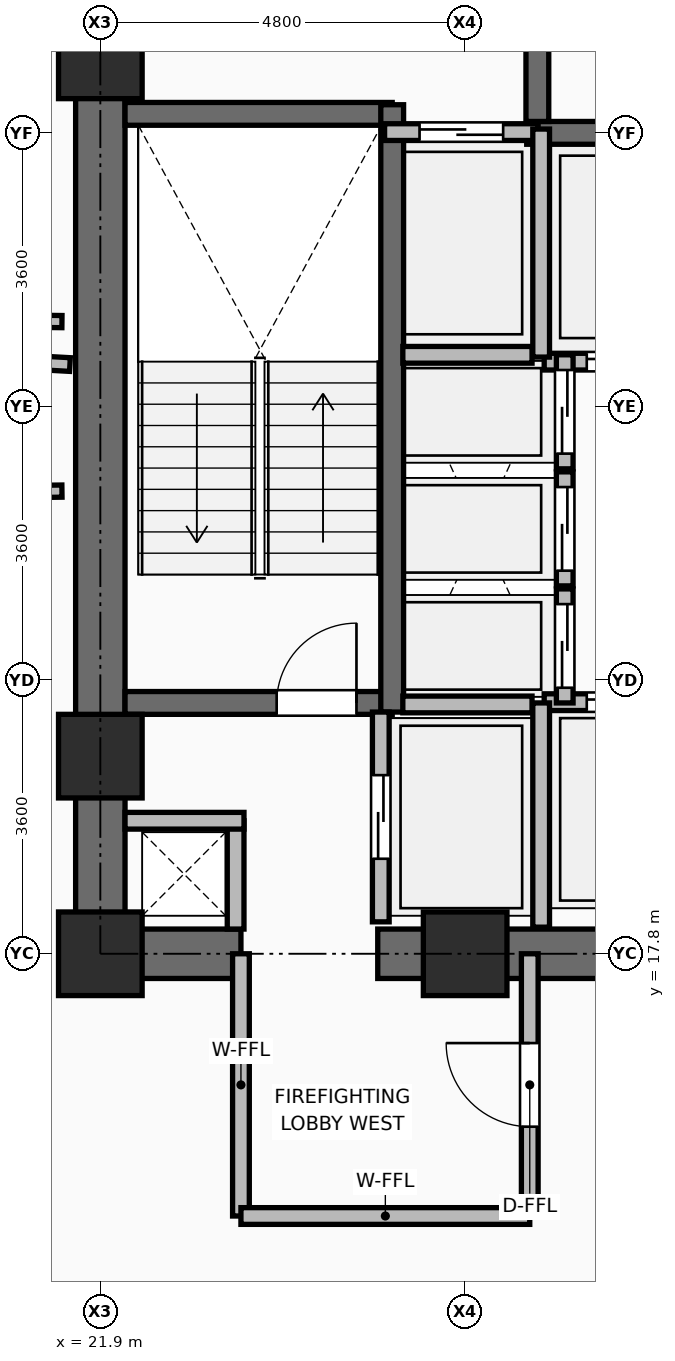
"""IFC4 building model, lengths in metres.
Left out: names, types, materials, properties, quantities, classifications, styles, units other than length and angle.
Written with IfcOpenShell. Run it as: python <this file> out.ifc"""

import sys

from ifc_helpers import new_model, si_unit, direction, frame, frame_2d, origin, origin_2d, place, context, subcontext, project, spatial, rectangle, extrude, element, fill, save


model = new_model("IFC4")
c1 = context("Model", 3, precision=1e-05, world=origin(), true_north=direction((0.0, 1.0)))
c2 = subcontext(c1, "Body", "Model", "MODEL_VIEW")
j1 = project(units=[si_unit("LENGTHUNIT", "METRE"), si_unit("PLANEANGLEUNIT", "RADIAN")], contexts=[c1])
p1 = place(None, origin())
s1 = spatial("IfcSite", under=j1, at=p1, CompositionType="ELEMENT")
p2 = place(p1, origin())
s2 = spatial("IfcBuilding", under=s1, at=p2, CompositionType="ELEMENT")
p3 = place(p2, frame((0.0, 0.0, 57.0)))
s3 = spatial("IfcBuildingStorey", under=s2, at=p3, CompositionType="ELEMENT", Elevation=57.0)
for number, where, z_axis, x_axis in (
    (1, (21.9, 17.8, 0.0), (0.0, 0.0, 1.0), (1.0, 0.0, 0.0)),
    (2, (26.7, 17.8, 0.0), (0.0, 0.0, 1.0), (1.0, 0.0, 0.0)),
    (3, (21.9, 20.4, 0.0), (0.0, 0.0, 1.0), (1.0, 0.0, 0.0)),
    (4, (21.9, 29.6, 0.0), (0.0, 0.0, 1.0), (1.0, 0.0, 0.0)),
):
    element("IfcColumn", number, at=place(p3, frame(where, z_axis=z_axis, x_axis=x_axis)), inside=s3, PredefinedType="COLUMN", context=c2, shape_type="SweptSolid", body=[
        extrude(rectangle(XDim=1.1, YDim=1.1, at=origin_2d()), origin(), (0.0, 0.0, 1.0), 3.75),
    ])
p4 = place(p3, frame((21.575, 17.8, 0.0), z_axis=(0.0, 0.0, 1.0), x_axis=(1.0, 0.0, 0.0)))
e5 = element("IfcWall", 5, at=p4, inside=s3, PredefinedType="SHEAR", context=c2, shape_type="SweptSolid", body=[
    extrude(rectangle(XDim=2.175, YDim=0.65, at=frame_2d((1.087, 0.0))), origin(), (0.0, 0.0, 1.0), 3.57),
])
p5 = place(p3, frame((25.55, 17.8, 0.0), z_axis=(0.0, 0.0, 1.0), x_axis=(1.0, 0.0, 0.0)))
e6 = element("IfcWall", 6, at=p5, inside=s3, PredefinedType="SHEAR", context=c2, shape_type="SweptSolid", body=[
    extrude(rectangle(XDim=6.9, YDim=0.65, at=frame_2d((3.45, 0.0))), origin(), (0.0, 0.0, 1.0), 3.57),
])
p6 = place(p3, frame((21.9, 18.125, 0.0), z_axis=(0.0, 0.0, 1.0), x_axis=(0.0, 1.0, 0.0)))
e7 = element("IfcWall", 7, at=p6, inside=s3, PredefinedType="SHEAR", context=c2, shape_type="SweptSolid", body=[
    extrude(rectangle(XDim=14.0, YDim=0.65, at=frame_2d((7.0, 0.0))), origin(), (0.0, 0.0, 1.0), 3.57),
])
p7 = place(p3, frame((22.225, 21.1, 0.0), z_axis=(0.0, 0.0, 1.0), x_axis=(1.0, 0.0, 0.0)))
e8 = element("IfcWall", 8, at=p7, inside=s3, PredefinedType="SHEAR", context=c2, shape_type="SweptSolid", body=[
    extrude(rectangle(XDim=3.515, YDim=0.3, at=frame_2d((1.757, 0.0))), origin(), (0.0, 0.0, 1.0), 3.57),
])
p8 = place(p7, frame((1.995, 0.0, 0.0)))
e9 = element("IfcOpeningElement", 9, at=p8, cuts=e8, PredefinedType="OPENING", context=c2, shape_type="SweptSolid", body=[
    extrude(rectangle(XDim=1.05, YDim=2.1, at=frame_2d((0.525, 1.05))), frame((0.0, 0.16, 0.0), z_axis=(0.0, -1.0, 0.0), x_axis=(1.0, 0.0, 0.0)), (0.0, 0.0, 1.0), 0.32),
])
p9 = place(p3, frame((22.225, 28.85, 0.0), z_axis=(0.0, 0.0, 1.0), x_axis=(1.0, 0.0, 0.0)))
e10 = element("IfcWall", 10, at=p9, inside=s3, PredefinedType="SHEAR", context=c2, shape_type="SweptSolid", body=[
    extrude(rectangle(XDim=3.515, YDim=0.3, at=frame_2d((1.757, 0.0))), origin(), (0.0, 0.0, 1.0), 3.57),
])
p10 = place(p3, frame((25.74, 20.98, 0.0), z_axis=(0.0, 0.0, 1.0), x_axis=(0.0, 1.0, 0.0)))
e11 = element("IfcWall", 11, at=p10, inside=s3, PredefinedType="SHEAR", context=c2, shape_type="SweptSolid", body=[
    extrude(rectangle(XDim=7.99, YDim=0.3, at=frame_2d((3.995, 0.0))), origin(), (0.0, 0.0, 1.0), 3.57),
])
p11 = place(p3, frame((27.51, 28.6, 0.0), z_axis=(0.0, 0.0, 1.0), x_axis=(1.0, 0.0, 0.0)))
e12 = element("IfcWall", 12, at=p11, inside=s3, PredefinedType="SHEAR", context=c2, shape_type="SweptSolid", body=[
    extrude(rectangle(XDim=8.03, YDim=0.3, at=frame_2d((4.015, 0.0))), origin(), (0.0, 0.0, 1.0), 3.57),
])
p12 = place(p3, frame((27.65, 28.75, 0.0), z_axis=(0.0, 0.0, 1.0), x_axis=(0.0, 1.0, 0.0)))
e13 = element("IfcWall", 13, at=p12, inside=s3, PredefinedType="SHEAR", context=c2, shape_type="SweptSolid", body=[
    extrude(rectangle(XDim=3.375, YDim=0.3, at=frame_2d((1.688, 0.0))), origin(), (0.0, 0.0, 1.0), 3.57),
])
p13 = place(p12, frame((1.0, 0.0, 0.0)))
e14 = element("IfcOpeningElement", 14, at=p13, cuts=e13, PredefinedType="OPENING", context=c2, shape_type="SweptSolid", body=[
    extrude(rectangle(XDim=1.05, YDim=2.1, at=frame_2d((0.525, 1.05))), frame((0.0, 0.16, 0.0), z_axis=(0.0, -1.0, 0.0), x_axis=(1.0, 0.0, 0.0)), (0.0, 0.0, 1.0), 0.32),
])
p14 = place(p3, frame((23.68, 18.125, 0.0), z_axis=(0.0, 0.0, 1.0), x_axis=(0.0, 1.0, 0.0)))
e15 = element("IfcWall", 15, at=p14, inside=s3, PredefinedType="PARTITIONING", context=c2, shape_type="SweptSolid", body=[
    extrude(rectangle(XDim=1.425, YDim=0.22, at=frame_2d((0.712, 0.0))), origin(), (0.0, 0.0, 1.0), 3.55),
])
p15 = place(p3, frame((22.225, 19.55, 0.0), z_axis=(0.0, 0.0, 1.0), x_axis=(1.0, 0.0, 0.0)))
e16 = element("IfcWall", 16, at=p15, inside=s3, PredefinedType="PARTITIONING", context=c2, shape_type="SweptSolid", body=[
    extrude(rectangle(XDim=1.565, YDim=0.22, at=frame_2d((0.782, 0.0))), origin(), (0.0, 0.0, 1.0), 2.595),
])
p16 = place(p3, frame((25.59, 18.22, 0.0), z_axis=(0.0, 0.0, 1.0), x_axis=(0.0, 1.0, 0.0)))
e17 = element("IfcWall", 17, at=p16, inside=s3, PredefinedType="PARTITIONING", context=c2, shape_type="SweptSolid", body=[
    extrude(rectangle(XDim=2.76, YDim=0.22, at=frame_2d((1.38, 0.0))), origin(), (0.0, 0.0, 1.0), 3.55),
])
p17 = place(p16, frame((0.83, 0.0, 0.0)))
e18 = element("IfcOpeningElement", 18, at=p17, cuts=e17, PredefinedType="OPENING", context=c2, shape_type="SweptSolid", body=[
    extrude(rectangle(XDim=1.1, YDim=2.2, at=frame_2d((0.55, 1.1))), frame((0.0, 0.12, 0.0), z_axis=(0.0, -1.0, 0.0), x_axis=(1.0, 0.0, 0.0)), (0.0, 0.0, 1.0), 0.24),
])
p18 = place(p3, frame((25.64, 28.61, 0.0), z_axis=(0.0, 0.0, 1.0), x_axis=(1.0, 0.0, 0.0)))
e19 = element("IfcWall", 19, at=p18, inside=s3, PredefinedType="PARTITIONING", context=c2, shape_type="SweptSolid", body=[
    extrude(rectangle(XDim=2.02, YDim=0.22, at=frame_2d((1.01, 0.0))), origin(), (0.0, 0.0, 1.0), 3.55),
])
p19 = place(p18, frame((0.46, 0.0, 0.0)))
e20 = element("IfcOpeningElement", 20, at=p19, cuts=e19, PredefinedType="OPENING", context=c2, shape_type="SweptSolid", body=[
    extrude(rectangle(XDim=1.1, YDim=2.2, at=frame_2d((0.55, 1.1))), frame((0.0, 0.12, 0.0), z_axis=(0.0, -1.0, 0.0), x_axis=(1.0, 0.0, 0.0)), (0.0, 0.0, 1.0), 0.24),
])
p20 = place(p3, frame((27.74, 21.11, 0.0), z_axis=(0.0, 0.0, 1.0), x_axis=(1.0, 0.0, 0.0)))
e21 = element("IfcWall", 21, at=p20, inside=s3, PredefinedType="PARTITIONING", context=c2, shape_type="SweptSolid", body=[
    extrude(rectangle(XDim=2.22, YDim=0.22, at=frame_2d((1.11, 0.0))), origin(), (0.0, 0.0, 1.0), 3.55),
])
p21 = place(p20, frame((0.56, 0.0, 0.0)))
e22 = element("IfcOpeningElement", 22, at=p21, cuts=e21, PredefinedType="OPENING", context=c2, shape_type="SweptSolid", body=[
    extrude(rectangle(XDim=1.1, YDim=2.2, at=frame_2d((0.55, 1.1))), frame((0.0, 0.12, 0.0), z_axis=(0.0, -1.0, 0.0), x_axis=(1.0, 0.0, 0.0)), (0.0, 0.0, 1.0), 0.24),
])
p22 = place(p3, frame((27.74, 25.59, 0.0), z_axis=(0.0, 0.0, 1.0), x_axis=(1.0, 0.0, 0.0)))
e23 = element("IfcWall", 23, at=p22, inside=s3, PredefinedType="PARTITIONING", context=c2, shape_type="SweptSolid", body=[
    extrude(rectangle(XDim=2.22, YDim=0.22, at=frame_2d((1.11, 0.0))), origin(), (0.0, 0.0, 1.0), 3.55),
])
p23 = place(p22, frame((0.56, 0.0, 0.0)))
e24 = element("IfcOpeningElement", 24, at=p23, cuts=e23, PredefinedType="OPENING", context=c2, shape_type="SweptSolid", body=[
    extrude(rectangle(XDim=1.1, YDim=2.2, at=frame_2d((0.55, 1.1))), frame((0.0, 0.12, 0.0), z_axis=(0.0, -1.0, 0.0), x_axis=(1.0, 0.0, 0.0)), (0.0, 0.0, 1.0), 0.24),
])
p24 = place(p3, frame((28.01, 21.1, 0.0), z_axis=(0.0, 0.0, 1.0), x_axis=(0.0, 1.0, 0.0)))
e25 = element("IfcWall", 25, at=p24, inside=s3, PredefinedType="PARTITIONING", context=c2, shape_type="SweptSolid", body=[
    extrude(rectangle(XDim=1.5, YDim=0.22, at=frame_2d((0.75, 0.0))), origin(), (0.0, 0.0, 1.0), 3.55),
])
p25 = place(p24, frame((0.2, 0.0, 0.0)))
e26 = element("IfcOpeningElement", 26, at=p25, cuts=e25, PredefinedType="OPENING", context=c2, shape_type="SweptSolid", body=[
    extrude(rectangle(XDim=1.1, YDim=2.2, at=frame_2d((0.55, 1.1))), frame((0.0, 0.12, 0.0), z_axis=(0.0, -1.0, 0.0), x_axis=(1.0, 0.0, 0.0)), (0.0, 0.0, 1.0), 0.24),
])
p26 = place(p3, frame((28.01, 22.64, 0.0), z_axis=(0.0, 0.0, 1.0), x_axis=(0.0, 1.0, 0.0)))
e27 = element("IfcWall", 27, at=p26, inside=s3, PredefinedType="PARTITIONING", context=c2, shape_type="SweptSolid", body=[
    extrude(rectangle(XDim=1.5, YDim=0.22, at=frame_2d((0.75, 0.0))), origin(), (0.0, 0.0, 1.0), 3.55),
])
p27 = place(p26, frame((0.2, 0.0, 0.0)))
e28 = element("IfcOpeningElement", 28, at=p27, cuts=e27, PredefinedType="OPENING", context=c2, shape_type="SweptSolid", body=[
    extrude(rectangle(XDim=1.1, YDim=2.2, at=frame_2d((0.55, 1.1))), frame((0.0, 0.12, 0.0), z_axis=(0.0, -1.0, 0.0), x_axis=(1.0, 0.0, 0.0)), (0.0, 0.0, 1.0), 0.24),
])
p28 = place(p3, frame((28.01, 24.18, 0.0), z_axis=(0.0, 0.0, 1.0), x_axis=(0.0, 1.0, 0.0)))
e29 = element("IfcWall", 29, at=p28, inside=s3, PredefinedType="PARTITIONING", context=c2, shape_type="SweptSolid", body=[
    extrude(rectangle(XDim=1.5, YDim=0.22, at=frame_2d((0.75, 0.0))), origin(), (0.0, 0.0, 1.0), 3.55),
])
p29 = place(p28, frame((0.2, 0.0, 0.0)))
e30 = element("IfcOpeningElement", 30, at=p29, cuts=e29, PredefinedType="OPENING", context=c2, shape_type="SweptSolid", body=[
    extrude(rectangle(XDim=1.1, YDim=2.2, at=frame_2d((0.55, 1.1))), frame((0.0, 0.12, 0.0), z_axis=(0.0, -1.0, 0.0), x_axis=(1.0, 0.0, 0.0)), (0.0, 0.0, 1.0), 0.24),
])
p30 = place(p3, frame((27.7, 18.15, 0.0), z_axis=(0.0, 0.0, 1.0), x_axis=(0.0, 1.0, 0.0)))
e31 = element("IfcWall", 31, at=p30, inside=s3, PredefinedType="PARTITIONING", context=c2, shape_type="SweptSolid", body=[
    extrude(rectangle(XDim=2.95, YDim=0.22, at=frame_2d((1.475, 0.0))), origin(), (0.0, 0.0, 1.0), 3.55),
])
p31 = place(p3, frame((27.7, 25.65, 0.0), z_axis=(0.0, 0.0, 1.0), x_axis=(0.0, 1.0, 0.0)))
e32 = element("IfcWall", 32, at=p31, inside=s3, PredefinedType="PARTITIONING", context=c2, shape_type="SweptSolid", body=[
    extrude(rectangle(XDim=3.0, YDim=0.22, at=frame_2d((1.5, 0.0))), origin(), (0.0, 0.0, 1.0), 3.55),
])
for number, where, z_axis, x_axis in (
    (33, (25.88, 21.08, 0.0), (0.0, 0.0, 1.0), (1.0, 0.0, 0.0)),
    (34, (25.88, 25.68, 0.0), (0.0, 0.0, 1.0), (1.0, 0.0, 0.0)),
):
    element("IfcWall", number, at=place(p3, frame(where, z_axis=z_axis, x_axis=x_axis)), inside=s3, PredefinedType="PARTITIONING", context=c2, shape_type="SweptSolid", body=[
        extrude(rectangle(XDim=1.7, YDim=0.22, at=frame_2d((0.85, 0.0))), origin(), (0.0, 0.0, 1.0), 3.55),
    ])
p32 = place(p3, frame((23.75, 14.35, 0.0), z_axis=(0.0, 0.0, 1.0), x_axis=(0.0, 1.0, 0.0)))
e35 = element("IfcWall", 35, at=p32, inside=s3, PredefinedType="PARTITIONING", context=c2, shape_type="SweptSolid", body=[
    extrude(rectangle(XDim=3.45, YDim=0.22, at=frame_2d((1.725, 0.0))), origin(), (0.0, 0.0, 1.0), 2.928),
])
p33 = place(p3, frame((23.75, 14.35, 0.0), z_axis=(0.0, 0.0, 1.0), x_axis=(1.0, 0.0, 0.0)))
e36 = element("IfcWall", 36, at=p33, inside=s3, PredefinedType="PARTITIONING", context=c2, shape_type="SweptSolid", body=[
    extrude(rectangle(XDim=3.8, YDim=0.22, at=frame_2d((1.9, 0.0))), origin(), (0.0, 0.0, 1.0), 3.55),
])
p34 = place(p3, frame((27.55, 14.35, 0.0), z_axis=(0.0, 0.0, 1.0), x_axis=(0.0, 1.0, 0.0)))
e37 = element("IfcWall", 37, at=p34, inside=s3, PredefinedType="PARTITIONING", context=c2, shape_type="SweptSolid", body=[
    extrude(rectangle(XDim=3.45, YDim=0.22, at=frame_2d((1.725, 0.0))), origin(), (0.0, 0.0, 1.0), 2.928),
])
p35 = place(p34, frame((1.175, 0.0, 0.0)))
e38 = element("IfcOpeningElement", 38, at=p35, cuts=e37, PredefinedType="OPENING", context=c2, shape_type="SweptSolid", body=[
    extrude(rectangle(XDim=1.1, YDim=2.1, at=frame_2d((0.55, 1.05))), frame((0.0, 0.12, 0.0), z_axis=(0.0, -1.0, 0.0), x_axis=(1.0, 0.0, 0.0)), (0.0, 0.0, 1.0), 0.24),
])
p36 = place(p3, frame((21.395, 26.117, 0.0), z_axis=(0.0, 0.0, 1.0), x_axis=(-0.999936661747, 0.011254887571, 0.0)))
e39 = element("IfcWall", 39, at=p36, inside=s3, PredefinedType="PARTITIONING", context=c2, shape_type="SweptSolid", body=[
    extrude(rectangle(XDim=2.234, YDim=0.16, at=frame_2d((1.117, 0.0))), origin(), (0.0, 0.0, 1.0), 3.55),
])
p37 = place(p3, frame((19.161, 23.858, 0.0), z_axis=(0.0, 0.0, 1.0), x_axis=(0.999915458151, 0.013002943888, 0.0)))
e40 = element("IfcWall", 40, at=p37, inside=s3, PredefinedType="PARTITIONING", context=c2, shape_type="SweptSolid", body=[
    extrude(rectangle(XDim=2.234, YDim=0.16, at=frame_2d((1.117, 0.0))), origin(), (0.0, 0.0, 1.0), 3.55),
])
p38 = place(p37, frame((0.874, 0.0, 0.0)))
e41 = element("IfcOpeningElement", 41, at=p38, cuts=e40, PredefinedType="OPENING", context=c2, shape_type="SweptSolid", body=[
    extrude(rectangle(XDim=1.2, YDim=2.1, at=frame_2d((0.6, 1.05))), frame((0.0, 0.09, 0.0), z_axis=(0.0, -1.0, 0.0), x_axis=(1.0, 0.0, 0.0)), (0.0, 0.0, 1.0), 0.18),
])
p39 = place(p3, frame((21.5, 25.552, 0.0), z_axis=(0.0, 0.0, 1.0), x_axis=(-0.998476368936, 0.055180981107, 0.0)))
e42 = element("IfcWall", 42, at=p39, inside=s3, PredefinedType="PARTITIONING", context=c2, shape_type="SweptSolid", body=[
    extrude(rectangle(XDim=17.777, YDim=0.18, at=frame_2d((8.889, 0.0))), origin(), (0.0, 0.0, 1.0), 2.595),
])
p40 = place(p8, origin())
e43 = element("IfcDoor", 43, at=p40, inside=s3, OperationType="SINGLE_SWING_RIGHT", PredefinedType="DOOR", context=c2, shape_type="SweptSolid", body=[
    extrude(rectangle(XDim=1.05, YDim=2.1, at=frame_2d((0.525, 1.05))), frame((0.0, 0.025, 0.0), z_axis=(0.0, -1.0, 0.0), x_axis=(1.0, 0.0, 0.0)), (0.0, 0.0, 1.0), 0.05),
])
fill(e9, e43)
p41 = place(p17, origin())
e44 = element("IfcDoor", 44, at=p41, inside=s3, OperationType="DOUBLE_DOOR_SLIDING", PredefinedType="DOOR", context=c2, shape_type="SweptSolid", body=[
    extrude(rectangle(XDim=1.1, YDim=2.2, at=frame_2d((0.55, 1.1))), frame((0.0, 0.025, 0.0), z_axis=(0.0, -1.0, 0.0), x_axis=(1.0, 0.0, 0.0)), (0.0, 0.0, 1.0), 0.05),
])
fill(e18, e44)
p42 = place(p19, origin())
e45 = element("IfcDoor", 45, at=p42, inside=s3, OperationType="DOUBLE_DOOR_SLIDING", PredefinedType="DOOR", context=c2, shape_type="SweptSolid", body=[
    extrude(rectangle(XDim=1.1, YDim=2.2, at=frame_2d((0.55, 1.1))), frame((0.0, 0.025, 0.0), z_axis=(0.0, -1.0, 0.0), x_axis=(1.0, 0.0, 0.0)), (0.0, 0.0, 1.0), 0.05),
])
fill(e20, e45)
p43 = place(p21, origin())
e46 = element("IfcDoor", 46, at=p43, inside=s3, OperationType="DOUBLE_DOOR_SLIDING", PredefinedType="DOOR", context=c2, shape_type="SweptSolid", body=[
    extrude(rectangle(XDim=1.1, YDim=2.2, at=frame_2d((0.55, 1.1))), frame((0.0, 0.025, 0.0), z_axis=(0.0, -1.0, 0.0), x_axis=(1.0, 0.0, 0.0)), (0.0, 0.0, 1.0), 0.05),
])
fill(e22, e46)
p44 = place(p23, frame((1.1, 0.0, 0.0), z_axis=(0.0, 0.0, 1.0), x_axis=(-1.0, 0.0, 0.0)))
e47 = element("IfcDoor", 47, at=p44, inside=s3, OperationType="DOUBLE_DOOR_SLIDING", PredefinedType="DOOR", context=c2, shape_type="SweptSolid", body=[
    extrude(rectangle(XDim=1.1, YDim=2.2, at=frame_2d((0.55, 1.1))), frame((0.0, 0.025, 0.0), z_axis=(0.0, -1.0, 0.0), x_axis=(1.0, 0.0, 0.0)), (0.0, 0.0, 1.0), 0.05),
])
fill(e24, e47)
p45 = place(p25, frame((1.1, 0.0, 0.0), z_axis=(0.0, 0.0, 1.0), x_axis=(-1.0, 0.0, 0.0)))
e48 = element("IfcDoor", 48, at=p45, inside=s3, OperationType="DOUBLE_DOOR_SLIDING", PredefinedType="DOOR", context=c2, shape_type="SweptSolid", body=[
    extrude(rectangle(XDim=1.1, YDim=2.2, at=frame_2d((0.55, 1.1))), frame((0.0, 0.025, 0.0), z_axis=(0.0, -1.0, 0.0), x_axis=(1.0, 0.0, 0.0)), (0.0, 0.0, 1.0), 0.05),
])
fill(e26, e48)
p46 = place(p27, frame((1.1, 0.0, 0.0), z_axis=(0.0, 0.0, 1.0), x_axis=(-1.0, 0.0, 0.0)))
e49 = element("IfcDoor", 49, at=p46, inside=s3, OperationType="DOUBLE_DOOR_SLIDING", PredefinedType="DOOR", context=c2, shape_type="SweptSolid", body=[
    extrude(rectangle(XDim=1.1, YDim=2.2, at=frame_2d((0.55, 1.1))), frame((0.0, 0.025, 0.0), z_axis=(0.0, -1.0, 0.0), x_axis=(1.0, 0.0, 0.0)), (0.0, 0.0, 1.0), 0.05),
])
fill(e28, e49)
p47 = place(p29, frame((1.1, 0.0, 0.0), z_axis=(0.0, 0.0, 1.0), x_axis=(-1.0, 0.0, 0.0)))
e50 = element("IfcDoor", 50, at=p47, inside=s3, OperationType="DOUBLE_DOOR_SLIDING", PredefinedType="DOOR", context=c2, shape_type="SweptSolid", body=[
    extrude(rectangle(XDim=1.1, YDim=2.2, at=frame_2d((0.55, 1.1))), frame((0.0, 0.025, 0.0), z_axis=(0.0, -1.0, 0.0), x_axis=(1.0, 0.0, 0.0)), (0.0, 0.0, 1.0), 0.05),
])
fill(e30, e50)
p48 = place(p35, origin())
e51 = element("IfcDoor", 51, at=p48, inside=s3, OperationType="SINGLE_SWING_RIGHT", PredefinedType="DOOR", context=c2, shape_type="SweptSolid", body=[
    extrude(rectangle(XDim=1.1, YDim=2.1, at=frame_2d((0.55, 1.05))), frame((0.0, 0.025, 0.0), z_axis=(0.0, -1.0, 0.0), x_axis=(1.0, 0.0, 0.0)), (0.0, 0.0, 1.0), 0.05),
])
fill(e38, e51)
save(model, sys.argv[1])
